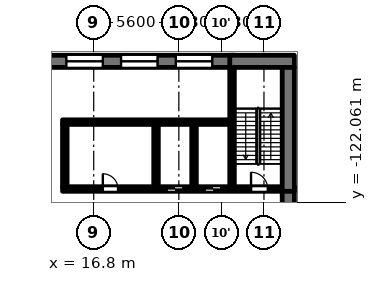
"""IFC4 building model, lengths in metres.
Left out: names, types, materials, properties, quantities, classifications, styles, units other than length and angle.
Written with IfcOpenShell. Run it as: python <this file> out.ifc"""

import sys

from ifc_helpers import new_model, si_unit, direction, frame, frame_2d, origin, place, context, subcontext, project, spatial, rectangle, extrude, element, fill, save


model = new_model("IFC4")
c1 = context("Model", 3, precision=1e-05, world=origin(), true_north=direction((0.0, 1.0)))
c2 = subcontext(c1, "Body", "Model", "MODEL_VIEW")
j1 = project(units=[si_unit("LENGTHUNIT", "METRE"), si_unit("PLANEANGLEUNIT", "RADIAN")], contexts=[c1])
p1 = place(None, origin())
s1 = spatial("IfcSite", under=j1, at=p1, CompositionType="ELEMENT")
p2 = place(p1, origin())
s2 = spatial("IfcBuilding", under=s1, at=p2, CompositionType="ELEMENT")
p3 = place(p2, frame((0.0, 0.0, 11.3)))
s3 = spatial("IfcBuildingStorey", under=s2, at=p3, CompositionType="ELEMENT", Elevation=11.3)
p4 = place(p3, frame((14.75, -121.2, 0.0), z_axis=(0.0, 0.0, 1.0), x_axis=(1.0, 0.0, 0.0)))
e1 = element("IfcWall", 1, at=p4, inside=s3, PredefinedType="SOLIDWALL", context=c2, shape_type="SweptSolid", body=[
    extrude(rectangle(XDim=14.45, YDim=0.3, at=frame_2d((7.225, 0.0))), origin(), (0.0, 0.0, 1.0), 4.45),
])
p5 = place(p4, frame((6.85, 0.0, 0.0)))
e2 = element("IfcOpeningElement", 2, at=p5, cuts=e1, PredefinedType="OPENING", context=c2, shape_type="SweptSolid", body=[
    extrude(rectangle(XDim=1.1, YDim=2.1, at=frame_2d((0.55, 1.05))), frame((0.0, 0.16, 0.0), z_axis=(0.0, -1.0, 0.0), x_axis=(1.0, 0.0, 0.0)), (0.0, 0.0, 1.0), 0.32),
])
p6 = place(p4, frame((9.35, 0.0, 0.0)))
e3 = element("IfcOpeningElement", 3, at=p6, cuts=e1, PredefinedType="OPENING", context=c2, shape_type="SweptSolid", body=[
    extrude(rectangle(XDim=1.1, YDim=2.1, at=frame_2d((0.55, 1.05))), frame((0.0, 0.16, 0.0), z_axis=(0.0, -1.0, 0.0), x_axis=(1.0, 0.0, 0.0)), (0.0, 0.0, 1.0), 0.32),
])
p7 = place(p4, frame((12.4, 0.0, 0.0)))
e4 = element("IfcOpeningElement", 4, at=p7, cuts=e1, PredefinedType="OPENING", context=c2, shape_type="SweptSolid", body=[
    extrude(rectangle(XDim=1.1, YDim=2.1, at=frame_2d((0.55, 1.05))), frame((0.0, 0.16, 0.0), z_axis=(0.0, -1.0, 0.0), x_axis=(1.0, 0.0, 0.0)), (0.0, 0.0, 1.0), 0.32),
])
p8 = place(p4, frame((2.65, 0.0, 0.0)))
e5 = element("IfcOpeningElement", 5, at=p8, cuts=e1, PredefinedType="OPENING", context=c2, shape_type="SweptSolid", body=[
    extrude(rectangle(XDim=1.0, YDim=2.1, at=frame_2d((0.5, 1.05))), frame((0.0, 0.16, 0.0), z_axis=(0.0, -1.0, 0.0), x_axis=(1.0, 0.0, 0.0)), (0.0, 0.0, 1.0), 0.32),
])
p9 = place(p3, frame((14.75, -116.8, 0.0), z_axis=(0.0, 0.0, 1.0), x_axis=(1.0, 0.0, 0.0)))
e6 = element("IfcWall", 6, at=p9, inside=s3, PredefinedType="SOLIDWALL", context=c2, shape_type="SweptSolid", body=[
    extrude(rectangle(XDim=11.0, YDim=0.3, at=frame_2d((5.5, 0.0))), origin(), (0.0, 0.0, 1.0), 4.45),
])
p10 = place(p3, frame((-26.05, -112.8, 0.0), z_axis=(0.0, 0.0, 1.0), x_axis=(1.0, 0.0, 0.0)))
e7 = element("IfcWall", 7, at=p10, inside=s3, PredefinedType="SOLIDWALL", context=c2, shape_type="SweptSolid", body=[
    extrude(rectangle(XDim=52.1, YDim=0.8, at=frame_2d((26.05, 0.0))), origin(), (0.0, 0.0, 1.0), 4.45),
])
p11 = place(p10, frame((1.45, 0.0, 0.6)))
e8 = element("IfcOpeningElement", 8, at=p11, cuts=e7, PredefinedType="OPENING", context=c2, shape_type="SweptSolid", body=[
    extrude(rectangle(XDim=2.4, YDim=3.2, at=frame_2d((1.2, 1.6))), frame((0.0, 0.41, 0.0), z_axis=(0.0, -1.0, 0.0), x_axis=(1.0, 0.0, 0.0)), (0.0, 0.0, 1.0), 0.82),
])
p12 = place(p10, frame((5.05, 0.0, 0.6)))
e9 = element("IfcOpeningElement", 9, at=p12, cuts=e7, PredefinedType="OPENING", context=c2, shape_type="SweptSolid", body=[
    extrude(rectangle(XDim=2.4, YDim=3.2, at=frame_2d((1.2, 1.6))), frame((0.0, 0.41, 0.0), z_axis=(0.0, -1.0, 0.0), x_axis=(1.0, 0.0, 0.0)), (0.0, 0.0, 1.0), 0.82),
])
p13 = place(p10, frame((8.65, 0.0, 0.6)))
e10 = element("IfcOpeningElement", 10, at=p13, cuts=e7, PredefinedType="OPENING", context=c2, shape_type="SweptSolid", body=[
    extrude(rectangle(XDim=2.4, YDim=3.2, at=frame_2d((1.2, 1.6))), frame((0.0, 0.41, 0.0), z_axis=(0.0, -1.0, 0.0), x_axis=(1.0, 0.0, 0.0)), (0.0, 0.0, 1.0), 0.82),
])
p14 = place(p10, frame((12.25, 0.0, 0.6)))
e11 = element("IfcOpeningElement", 11, at=p14, cuts=e7, PredefinedType="OPENING", context=c2, shape_type="SweptSolid", body=[
    extrude(rectangle(XDim=2.4, YDim=3.2, at=frame_2d((1.2, 1.6))), frame((0.0, 0.41, 0.0), z_axis=(0.0, -1.0, 0.0), x_axis=(1.0, 0.0, 0.0)), (0.0, 0.0, 1.0), 0.82),
])
p15 = place(p10, frame((15.85, 0.0, 0.6)))
e12 = element("IfcOpeningElement", 12, at=p15, cuts=e7, PredefinedType="OPENING", context=c2, shape_type="SweptSolid", body=[
    extrude(rectangle(XDim=2.4, YDim=3.2, at=frame_2d((1.2, 1.6))), frame((0.0, 0.41, 0.0), z_axis=(0.0, -1.0, 0.0), x_axis=(1.0, 0.0, 0.0)), (0.0, 0.0, 1.0), 0.82),
])
p16 = place(p10, frame((19.45, 0.0, 0.6)))
e13 = element("IfcOpeningElement", 13, at=p16, cuts=e7, PredefinedType="OPENING", context=c2, shape_type="SweptSolid", body=[
    extrude(rectangle(XDim=2.4, YDim=3.2, at=frame_2d((1.2, 1.6))), frame((0.0, 0.41, 0.0), z_axis=(0.0, -1.0, 0.0), x_axis=(1.0, 0.0, 0.0)), (0.0, 0.0, 1.0), 0.82),
])
p17 = place(p10, frame((23.05, 0.0, 0.6)))
e14 = element("IfcOpeningElement", 14, at=p17, cuts=e7, PredefinedType="OPENING", context=c2, shape_type="SweptSolid", body=[
    extrude(rectangle(XDim=2.4, YDim=3.2, at=frame_2d((1.2, 1.6))), frame((0.0, 0.41, 0.0), z_axis=(0.0, -1.0, 0.0), x_axis=(1.0, 0.0, 0.0)), (0.0, 0.0, 1.0), 0.82),
])
p18 = place(p10, frame((26.65, 0.0, 0.6)))
e15 = element("IfcOpeningElement", 15, at=p18, cuts=e7, PredefinedType="OPENING", context=c2, shape_type="SweptSolid", body=[
    extrude(rectangle(XDim=2.4, YDim=3.2, at=frame_2d((1.2, 1.6))), frame((0.0, 0.41, 0.0), z_axis=(0.0, -1.0, 0.0), x_axis=(1.0, 0.0, 0.0)), (0.0, 0.0, 1.0), 0.82),
])
p19 = place(p10, frame((30.25, 0.0, 0.6)))
e16 = element("IfcOpeningElement", 16, at=p19, cuts=e7, PredefinedType="OPENING", context=c2, shape_type="SweptSolid", body=[
    extrude(rectangle(XDim=2.4, YDim=3.2, at=frame_2d((1.2, 1.6))), frame((0.0, 0.41, 0.0), z_axis=(0.0, -1.0, 0.0), x_axis=(1.0, 0.0, 0.0)), (0.0, 0.0, 1.0), 0.82),
])
p20 = place(p10, frame((33.85, 0.0, 0.6)))
e17 = element("IfcOpeningElement", 17, at=p20, cuts=e7, PredefinedType="OPENING", context=c2, shape_type="SweptSolid", body=[
    extrude(rectangle(XDim=2.4, YDim=3.2, at=frame_2d((1.2, 1.6))), frame((0.0, 0.41, 0.0), z_axis=(0.0, -1.0, 0.0), x_axis=(1.0, 0.0, 0.0)), (0.0, 0.0, 1.0), 0.82),
])
p21 = place(p10, frame((37.45, 0.0, 0.6)))
e18 = element("IfcOpeningElement", 18, at=p21, cuts=e7, PredefinedType="OPENING", context=c2, shape_type="SweptSolid", body=[
    extrude(rectangle(XDim=2.4, YDim=3.2, at=frame_2d((1.2, 1.6))), frame((0.0, 0.41, 0.0), z_axis=(0.0, -1.0, 0.0), x_axis=(1.0, 0.0, 0.0)), (0.0, 0.0, 1.0), 0.82),
])
p22 = place(p10, frame((41.05, 0.0, 0.6)))
e19 = element("IfcOpeningElement", 19, at=p22, cuts=e7, PredefinedType="OPENING", context=c2, shape_type="SweptSolid", body=[
    extrude(rectangle(XDim=2.4, YDim=3.2, at=frame_2d((1.2, 1.6))), frame((0.0, 0.41, 0.0), z_axis=(0.0, -1.0, 0.0), x_axis=(1.0, 0.0, 0.0)), (0.0, 0.0, 1.0), 0.82),
])
p23 = place(p10, frame((44.65, 0.0, 0.6)))
e20 = element("IfcOpeningElement", 20, at=p23, cuts=e7, PredefinedType="OPENING", context=c2, shape_type="SweptSolid", body=[
    extrude(rectangle(XDim=2.4, YDim=3.2, at=frame_2d((1.2, 1.6))), frame((0.0, 0.41, 0.0), z_axis=(0.0, -1.0, 0.0), x_axis=(1.0, 0.0, 0.0)), (0.0, 0.0, 1.0), 0.82),
])
p24 = place(p10, frame((48.25, 0.0, 0.6)))
e21 = element("IfcOpeningElement", 21, at=p24, cuts=e7, PredefinedType="OPENING", context=c2, shape_type="SweptSolid", body=[
    extrude(rectangle(XDim=2.4, YDim=3.2, at=frame_2d((1.2, 1.6))), frame((0.0, 0.41, 0.0), z_axis=(0.0, -1.0, 0.0), x_axis=(1.0, 0.0, 0.0)), (0.0, 0.0, 1.0), 0.82),
])
p25 = place(p3, frame((25.75, -112.8, 0.0), z_axis=(0.0, 0.0, 1.0), x_axis=(1.0, 0.0, 0.0)))
e22 = element("IfcWall", 22, at=p25, inside=s3, PredefinedType="SOLIDWALL", context=c2, shape_type="SweptSolid", body=[
    extrude(rectangle(XDim=4.25, YDim=0.8, at=frame_2d((2.125, 0.0))), origin(), (0.0, 0.0, 1.0), 4.45),
])
for number, where, z_axis, x_axis in (
    (23, (14.9, -121.05, 0.0), (0.0, 0.0, 1.0), (0.0, 1.0, 0.0)),
    (24, (20.9, -121.05, 0.0), (0.0, 0.0, 1.0), (0.0, 1.0, 0.0)),
    (25, (23.4, -121.05, 0.0), (0.0, 0.0, 1.0), (0.0, 1.0, 0.0)),
):
    element("IfcWall", number, at=place(p3, frame(where, z_axis=z_axis, x_axis=x_axis)), inside=s3, PredefinedType="SOLIDWALL", context=c2, shape_type="SweptSolid", body=[
        extrude(rectangle(XDim=4.1, YDim=0.3, at=frame_2d((2.05, 0.0))), origin(), (0.0, 0.0, 1.0), 4.45),
    ])
p26 = place(p3, frame((25.9, -121.05, 0.0), z_axis=(0.0, 0.0, 1.0), x_axis=(0.0, 1.0, 0.0)))
e26 = element("IfcWall", 26, at=p26, inside=s3, PredefinedType="SOLIDWALL", context=c2, shape_type="SweptSolid", body=[
    extrude(rectangle(XDim=7.85, YDim=0.3, at=frame_2d((3.925, 0.0))), origin(), (0.0, 0.0, 1.0), 4.45),
])
p27 = place(p3, frame((29.6, -121.05, 0.0), z_axis=(0.0, 0.0, 1.0), x_axis=(0.0, -1.0, 0.0)))
e27 = element("IfcWall", 27, at=p27, inside=s3, PredefinedType="SOLIDWALL", context=c2, shape_type="SweptSolid", body=[
    extrude(rectangle(XDim=3.875, YDim=0.8, at=frame_2d((1.938, 0.0))), origin(), (0.0, 0.0, 1.0), 4.45),
])
p28 = place(p3, frame((29.6, -113.2, 0.0), z_axis=(0.0, 0.0, 1.0), x_axis=(0.0, -1.0, 0.0)))
e28 = element("IfcWall", 28, at=p28, inside=s3, PredefinedType="SOLIDWALL", context=c2, shape_type="SweptSolid", body=[
    extrude(rectangle(XDim=8.15, YDim=0.8, at=frame_2d((4.075, 0.0))), origin(), (0.0, 0.0, 1.0), 4.45),
])
p29 = place(p22, origin())
e29 = element("IfcWindow", 29, at=p29, inside=s3, PartitioningType="SINGLE_PANEL", PredefinedType="WINDOW", context=c2, shape_type="SweptSolid", body=[
    extrude(rectangle(XDim=2.4, YDim=3.2, at=frame_2d((1.2, 1.6))), frame((0.0, 0.03, 0.0), z_axis=(0.0, -1.0, 0.0), x_axis=(1.0, 0.0, 0.0)), (0.0, 0.0, 1.0), 0.06),
])
fill(e19, e29)
p30 = place(p23, origin())
e30 = element("IfcWindow", 30, at=p30, inside=s3, PartitioningType="SINGLE_PANEL", PredefinedType="WINDOW", context=c2, shape_type="SweptSolid", body=[
    extrude(rectangle(XDim=2.4, YDim=3.2, at=frame_2d((1.2, 1.6))), frame((0.0, 0.03, 0.0), z_axis=(0.0, -1.0, 0.0), x_axis=(1.0, 0.0, 0.0)), (0.0, 0.0, 1.0), 0.06),
])
fill(e20, e30)
p31 = place(p24, origin())
e31 = element("IfcWindow", 31, at=p31, inside=s3, PartitioningType="SINGLE_PANEL", PredefinedType="WINDOW", context=c2, shape_type="SweptSolid", body=[
    extrude(rectangle(XDim=2.4, YDim=3.2, at=frame_2d((1.2, 1.6))), frame((0.0, 0.03, 0.0), z_axis=(0.0, -1.0, 0.0), x_axis=(1.0, 0.0, 0.0)), (0.0, 0.0, 1.0), 0.06),
])
fill(e21, e31)
p32 = place(p5, origin())
e32 = element("IfcDoor", 32, at=p32, inside=s3, OperationType="DOUBLE_DOOR_SLIDING", PredefinedType="DOOR", context=c2, shape_type="SweptSolid", body=[
    extrude(rectangle(XDim=1.1, YDim=2.1, at=frame_2d((0.55, 1.05))), frame((0.0, 0.025, 0.0), z_axis=(0.0, -1.0, 0.0), x_axis=(1.0, 0.0, 0.0)), (0.0, 0.0, 1.0), 0.05),
])
fill(e2, e32)
p33 = place(p6, origin())
e33 = element("IfcDoor", 33, at=p33, inside=s3, OperationType="DOUBLE_DOOR_SLIDING", PredefinedType="DOOR", context=c2, shape_type="SweptSolid", body=[
    extrude(rectangle(XDim=1.1, YDim=2.1, at=frame_2d((0.55, 1.05))), frame((0.0, 0.025, 0.0), z_axis=(0.0, -1.0, 0.0), x_axis=(1.0, 0.0, 0.0)), (0.0, 0.0, 1.0), 0.05),
])
fill(e3, e33)
p34 = place(p7, origin())
e34 = element("IfcDoor", 34, at=p34, inside=s3, OperationType="SINGLE_SWING_LEFT", PredefinedType="DOOR", context=c2, shape_type="SweptSolid", body=[
    extrude(rectangle(XDim=1.1, YDim=2.1, at=frame_2d((0.55, 1.05))), frame((0.0, 0.025, 0.0), z_axis=(0.0, -1.0, 0.0), x_axis=(1.0, 0.0, 0.0)), (0.0, 0.0, 1.0), 0.05),
])
fill(e4, e34)
p35 = place(p8, origin())
e35 = element("IfcDoor", 35, at=p35, inside=s3, OperationType="SINGLE_SWING_LEFT", PredefinedType="DOOR", context=c2, shape_type="SweptSolid", body=[
    extrude(rectangle(XDim=1.0, YDim=2.1, at=frame_2d((0.5, 1.05))), frame((0.0, 0.025, 0.0), z_axis=(0.0, -1.0, 0.0), x_axis=(1.0, 0.0, 0.0)), (0.0, 0.0, 1.0), 0.05),
])
fill(e5, e35)
save(model, sys.argv[1])
